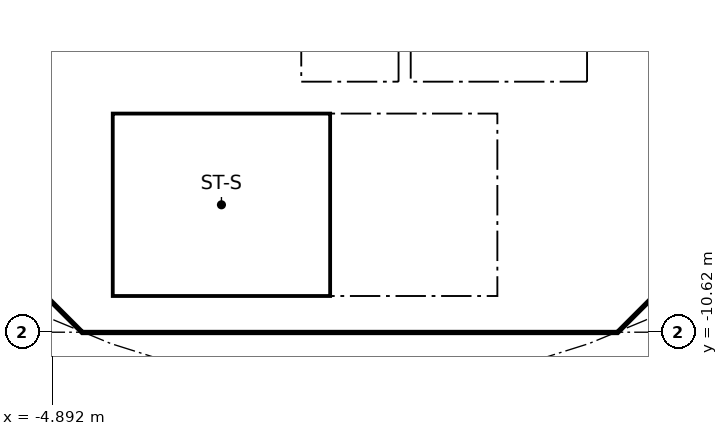
"""IFC4 building model, lengths in metres.
Left out: names, types, materials, properties, quantities, classifications, styles, units other than length and angle.
Written with IfcOpenShell. Run it as: python <this file> out.ifc"""

import sys

from ifc_helpers import new_model, si_unit, direction, frame, frame_2d, origin, place, context, subcontext, project, spatial, polyline, rectangle, outline, extrude, element, fill, save


model = new_model("IFC4")
c1 = context("Model", 3, precision=1e-05, world=origin(), true_north=direction((0.0, 1.0)))
c2 = subcontext(c1, "Body", "Model", "MODEL_VIEW")
j1 = project(units=[si_unit("LENGTHUNIT", "METRE"), si_unit("PLANEANGLEUNIT", "RADIAN")], contexts=[c1])
p1 = place(None, origin())
s1 = spatial("IfcSite", under=j1, at=p1, CompositionType="ELEMENT")
p2 = place(p1, origin())
s2 = spatial("IfcBuilding", under=s1, at=p2, CompositionType="ELEMENT")
p3 = place(p2, frame((0.0, 0.0, 149.2)))
s3 = spatial("IfcBuildingStorey", under=s2, at=p3, CompositionType="ELEMENT", Elevation=149.2)
p4 = place(p3, frame((-9.988, -4.613, 0.0), z_axis=(0.0, 0.0, 1.0), x_axis=(0.707106781187, -0.707106781187, 0.0)))
e1 = element("IfcWall", 1, at=p4, inside=s3, PredefinedType="SHEAR", context=c2, shape_type="SweptSolid", body=[
    extrude(rectangle(XDim=7.602, YDim=0.6, at=frame_2d((3.801, 0.0))), origin(), (0.0, 0.0, 1.0), 3.44),
])
p5 = place(p4, frame((6.151, 0.0, 0.0)))
e2 = element("IfcOpeningElement", 2, at=p5, cuts=e1, PredefinedType="OPENING", context=c2, shape_type="SweptSolid", body=[
    extrude(rectangle(XDim=1.1, YDim=2.1, at=frame_2d((0.55, 1.05))), frame((0.0, 0.31, 0.0), z_axis=(0.0, -1.0, 0.0), x_axis=(1.0, 0.0, 0.0)), (0.0, 0.0, 1.0), 0.62),
])
p6 = place(p3, frame((4.613, -9.988, 0.0), z_axis=(0.0, 0.0, 1.0), x_axis=(0.707106781187, 0.707106781187, 0.0)))
e3 = element("IfcWall", 3, at=p6, inside=s3, PredefinedType="SHEAR", context=c2, shape_type="SweptSolid", body=[
    extrude(rectangle(XDim=7.602, YDim=0.6, at=frame_2d((3.801, 0.0))), origin(), (0.0, 0.0, 1.0), 3.44),
])
p7 = place(p6, frame((3.201, 0.0, 0.0)))
e4 = element("IfcOpeningElement", 4, at=p7, cuts=e3, PredefinedType="OPENING", context=c2, shape_type="SweptSolid", body=[
    extrude(rectangle(XDim=1.2, YDim=2.1, at=frame_2d((0.6, 1.05))), frame((0.0, 0.31, 0.0), z_axis=(0.0, -1.0, 0.0), x_axis=(1.0, 0.0, 0.0)), (0.0, 0.0, 1.0), 0.62),
])
p8 = place(p3, frame((4.0, -10.025, 0.0), z_axis=(0.0, 0.0, 1.0), x_axis=(0.0, 1.0, 0.0)))
e5 = element("IfcWall", 5, at=p8, inside=s3, PredefinedType="SOLIDWALL", context=c2, shape_type="SweptSolid", body=[
    extrude(rectangle(XDim=3.0, YDim=0.2, at=frame_2d((1.5, 0.0))), origin(), (0.0, 0.0, 1.0), 3.44),
])
p9 = place(p8, frame((0.975, 0.0, 0.0)))
e6 = element("IfcOpeningElement", 6, at=p9, cuts=e5, PredefinedType="OPENING", context=c2, shape_type="SweptSolid", body=[
    extrude(rectangle(XDim=1.1, YDim=2.1, at=frame_2d((0.55, 1.05))), frame((0.0, 0.11, 0.0), z_axis=(0.0, -1.0, 0.0), x_axis=(1.0, 0.0, 0.0)), (0.0, 0.0, 1.0), 0.22),
])
p10 = place(p3, frame((4.0, -6.5, 0.0), z_axis=(0.0, 0.0, 1.0), x_axis=(0.0, 1.0, 0.0)))
e7 = element("IfcWall", 7, at=p10, inside=s3, PredefinedType="SOLIDWALL", context=c2, shape_type="SweptSolid", body=[
    extrude(rectangle(XDim=2.2, YDim=0.2, at=frame_2d((1.1, 0.0))), origin(), (0.0, 0.0, 1.0), 3.44),
])
p11 = place(p10, frame((0.55, 0.0, 0.0)))
e8 = element("IfcOpeningElement", 8, at=p11, cuts=e7, PredefinedType="OPENING", context=c2, shape_type="SweptSolid", body=[
    extrude(rectangle(XDim=1.1, YDim=2.1, at=frame_2d((0.55, 1.05))), frame((0.0, 0.11, 0.0), z_axis=(0.0, -1.0, 0.0), x_axis=(1.0, 0.0, 0.0)), (0.0, 0.0, 1.0), 0.22),
])
p12 = place(p3, frame((-4.0, -6.5, 0.0), z_axis=(0.0, 0.0, 1.0), x_axis=(0.0, 1.0, 0.0)))
e9 = element("IfcWall", 9, at=p12, inside=s3, PredefinedType="SOLIDWALL", context=c2, shape_type="SweptSolid", body=[
    extrude(rectangle(XDim=2.2, YDim=0.2, at=frame_2d((1.1, 0.0))), origin(), (0.0, 0.0, 1.0), 3.44),
])
p13 = place(p12, frame((0.65, 0.0, 0.0)))
e10 = element("IfcOpeningElement", 10, at=p13, cuts=e9, PredefinedType="OPENING", context=c2, shape_type="SweptSolid", body=[
    extrude(rectangle(XDim=0.9, YDim=2.1, at=frame_2d((0.45, 1.05))), frame((0.0, 0.11, 0.0), z_axis=(0.0, -1.0, 0.0), x_axis=(1.0, 0.0, 0.0)), (0.0, 0.0, 1.0), 0.22),
])
p14 = place(p3, origin())
e11 = element("IfcWall", 11, at=p14, inside=s3, PredefinedType="SHEAR", context=c2, shape_type="SweptSolid", body=[
    extrude(outline(polyline([(-4.152, -10.025), (4.152, -10.025), (4.401, -9.776), (4.825, -10.2), (4.401, -10.625), (-4.401, -10.625), (-4.825, -10.2), (-4.401, -9.776), (-4.152, -10.025)])), origin(), (0.0, 0.0, 1.0), 3.44),
])
for number, where, z_axis, x_axis in (
    (12, (-0.9, -6.5, 0.0), (0.0, 0.0, 1.0), (0.0, 1.0, 0.0)),
    (13, (0.9, -6.5, 0.0), (0.0, 0.0, 1.0), (0.0, 1.0, 0.0)),
):
    element("IfcWall", number, at=place(p3, frame(where, z_axis=z_axis, x_axis=x_axis)), inside=s3, PredefinedType="SOLIDWALL", context=c2, shape_type="SweptSolid", body=[
        extrude(rectangle(XDim=2.2, YDim=0.2, at=frame_2d((1.1, 0.0))), origin(), (0.0, 0.0, 1.0), 3.44),
    ])
p15 = place(p3, origin())
e14 = element("IfcWall", 14, at=p15, inside=s3, PredefinedType="SOLIDWALL", context=c2, shape_type="SweptSolid", body=[
    extrude(outline(polyline([(-3.9, -10.025), (-4.1, -10.025), (-4.1, -7.025), (-3.9, -7.025), (-3.9, -10.025)])), origin(), (0.0, 0.0, 1.0), 3.44),
])
p16 = place(p3, origin())
e15 = element("IfcWall", 15, at=p16, inside=s3, PredefinedType="SOLIDWALL", context=c2, shape_type="SweptSolid", body=[
    extrude(outline(polyline([(4.1, -7.025), (-4.1, -7.025), (-4.1, -6.5), (4.1, -6.5), (4.1, -7.025)])), origin(), (0.0, 0.0, 1.0), 3.44),
])
p17 = place(p9, origin())
e16 = element("IfcDoor", 16, at=p17, inside=s3, OperationType="SINGLE_SWING_LEFT", PredefinedType="DOOR", context=c2, shape_type="SweptSolid", body=[
    extrude(rectangle(XDim=1.1, YDim=2.1, at=frame_2d((0.55, 1.05))), frame((0.0, 0.025, 0.0), z_axis=(0.0, -1.0, 0.0), x_axis=(1.0, 0.0, 0.0)), (0.0, 0.0, 1.0), 0.05),
])
fill(e6, e16)
p18 = place(p5, origin())
e17 = element("IfcDoor", 17, at=p18, inside=s3, OperationType="SINGLE_SWING_LEFT", PredefinedType="DOOR", context=c2, shape_type="SweptSolid", body=[
    extrude(rectangle(XDim=1.1, YDim=2.1, at=frame_2d((0.55, 1.05))), frame((0.0, 0.025, 0.0), z_axis=(0.0, -1.0, 0.0), x_axis=(1.0, 0.0, 0.0)), (0.0, 0.0, 1.0), 0.05),
])
fill(e2, e17)
save(model, sys.argv[1])
